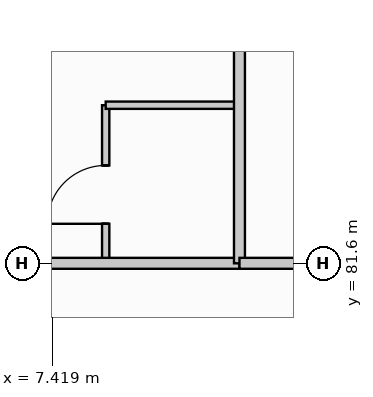
"""IFC4 building model, lengths in metres.
Left out: names, types, materials, properties, quantities, classifications, styles, units other than length and angle.
Written with IfcOpenShell. Run it as: python <this file> out.ifc"""

import sys

from ifc_helpers import new_model, si_unit, direction, frame, frame_2d, origin, place, context, subcontext, project, spatial, rectangle, extrude, element, fill, save


model = new_model("IFC4")
c1 = context("Model", 3, precision=1e-05, world=origin(), true_north=direction((0.0, 1.0)))
c2 = subcontext(c1, "Body", "Model", "MODEL_VIEW")
j1 = project(units=[si_unit("LENGTHUNIT", "METRE"), si_unit("PLANEANGLEUNIT", "RADIAN")], contexts=[c1])
p1 = place(None, origin())
s1 = spatial("IfcSite", under=j1, at=p1, CompositionType="ELEMENT")
p2 = place(p1, origin())
s2 = spatial("IfcBuilding", under=s1, at=p2, CompositionType="ELEMENT")
p3 = place(p2, frame((0.0, 0.0, 4.8)))
s3 = spatial("IfcBuildingStorey", under=s2, at=p3, CompositionType="ELEMENT", Elevation=4.8)
p4 = place(p3, frame((8.3, 81.6, 0.0), z_axis=(0.0, 0.0, 1.0), x_axis=(0.0, 1.0, 0.0)))
e1 = element("IfcWall", 1, at=p4, inside=s3, PredefinedType="PARTITIONING", context=c2, shape_type="SweptSolid", body=[
    extrude(rectangle(XDim=2.6, YDim=0.12, at=frame_2d((1.3, 0.0))), origin(), (0.0, 0.0, 1.0), 3.955),
])
p5 = place(p4, frame((0.65, 0.0, 0.0)))
e2 = element("IfcOpeningElement", 2, at=p5, cuts=e1, PredefinedType="OPENING", context=c2, shape_type="SweptSolid", body=[
    extrude(rectangle(XDim=0.96, YDim=2.06, at=frame_2d((0.48, 1.03))), frame((0.0, 0.07, 0.0), z_axis=(0.0, -1.0, 0.0), x_axis=(1.0, 0.0, 0.0)), (0.0, 0.0, 1.0), 0.14),
])
p6 = place(p3, frame((8.3, 84.2, 0.0), z_axis=(0.0, 0.0, 1.0), x_axis=(1.0, 0.0, 0.0)))
e3 = element("IfcWall", 3, at=p6, inside=s3, PredefinedType="PARTITIONING", context=c2, shape_type="SweptSolid", body=[
    extrude(rectangle(XDim=2.2, YDim=0.12, at=frame_2d((1.1, 0.0))), origin(), (0.0, 0.0, 1.0), 4.43),
])
p7 = place(p3, frame((0.3, 81.6, 0.0), z_axis=(0.0, 0.0, 1.0), x_axis=(1.0, 0.0, 0.0)))
e4 = element("IfcWall", 4, at=p7, inside=s3, PredefinedType="PARTITIONING", context=c2, shape_type="SweptSolid", body=[
    extrude(rectangle(XDim=10.2, YDim=0.18, at=frame_2d((5.1, 0.0))), origin(), (0.0, 0.0, 1.0), 3.955),
])
p8 = place(p7, frame((0.55, 0.0, 0.0)))
e5 = element("IfcOpeningElement", 5, at=p8, cuts=e4, PredefinedType="OPENING", context=c2, shape_type="SweptSolid", body=[
    extrude(rectangle(XDim=1.48, YDim=2.26, at=frame_2d((0.74, 1.13))), frame((0.0, 0.1, 0.0), z_axis=(0.0, -1.0, 0.0), x_axis=(1.0, 0.0, 0.0)), (0.0, 0.0, 1.0), 0.2),
])
p9 = place(p3, frame((10.5, 81.6, 0.0), z_axis=(0.0, 0.0, 1.0), x_axis=(0.0, 1.0, 0.0)))
e6 = element("IfcWall", 6, at=p9, inside=s3, PredefinedType="PARTITIONING", context=c2, shape_type="SweptSolid", body=[
    extrude(rectangle(XDim=44.1, YDim=0.18, at=frame_2d((22.05, 0.0))), origin(), (0.0, 0.0, 1.0), 3.465),
])
p10 = place(p3, frame((10.5, 81.6, 0.0), z_axis=(0.0, 0.0, 1.0), x_axis=(1.0, 0.0, 0.0)))
e7 = element("IfcWall", 7, at=p10, inside=s3, PredefinedType="PARTITIONING", context=c2, shape_type="SweptSolid", body=[
    extrude(rectangle(XDim=10.2, YDim=0.18, at=frame_2d((5.1, 0.0))), origin(), (0.0, 0.0, 1.0), 3.465),
])
p11 = place(p10, frame((2.077, 0.0, 0.0)))
e8 = element("IfcOpeningElement", 8, at=p11, cuts=e7, PredefinedType="OPENING", context=c2, shape_type="SweptSolid", body=[
    extrude(rectangle(XDim=1.48, YDim=2.26, at=frame_2d((0.74, 1.13))), frame((0.0, 0.1, 0.0), z_axis=(0.0, -1.0, 0.0), x_axis=(1.0, 0.0, 0.0)), (0.0, 0.0, 1.0), 0.2),
])
p12 = place(p5, origin())
e9 = element("IfcDoor", 9, at=p12, inside=s3, OperationType="SINGLE_SWING_LEFT", PredefinedType="DOOR", context=c2, shape_type="SweptSolid", body=[
    extrude(rectangle(XDim=0.96, YDim=2.06, at=frame_2d((0.48, 1.03))), frame((0.0, 0.025, 0.0), z_axis=(0.0, -1.0, 0.0), x_axis=(1.0, 0.0, 0.0)), (0.0, 0.0, 1.0), 0.05),
])
fill(e2, e9)
save(model, sys.argv[1])
